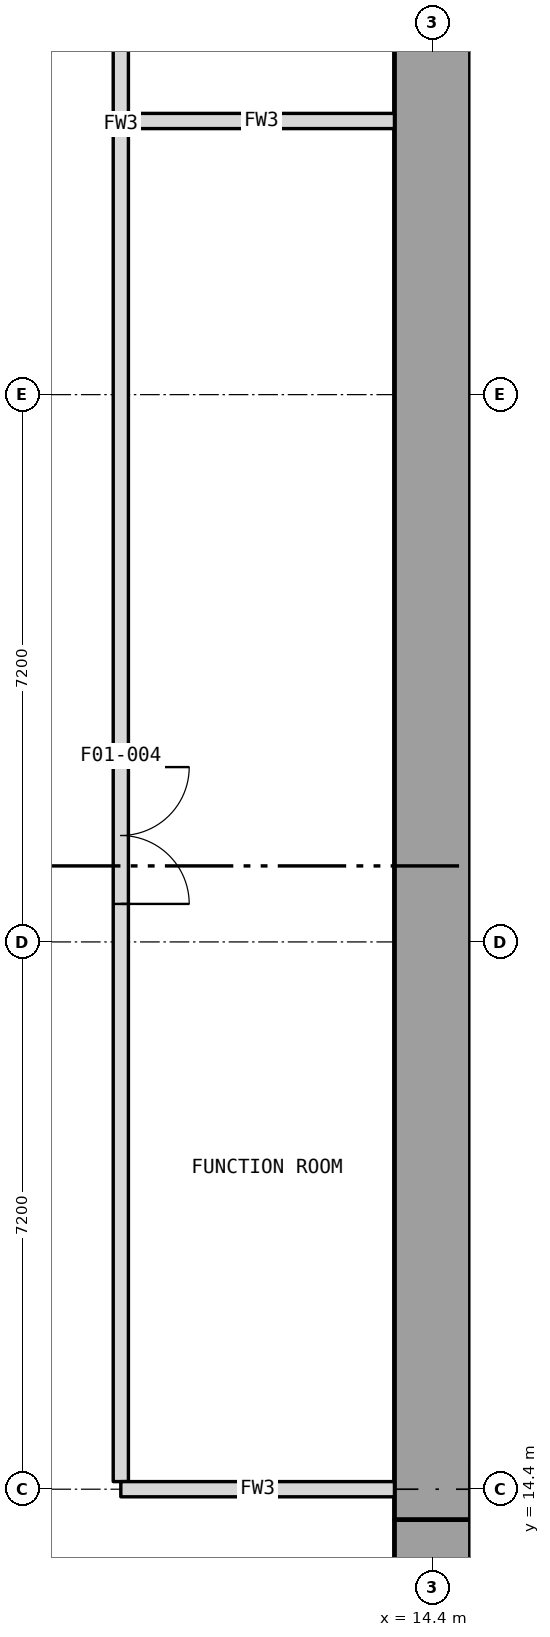
"""IFC4 building model, lengths in metres.
Left out: names, types, materials, properties, quantities, classifications, styles, units other than length and angle.
Written with IfcOpenShell. Run it as: python <this file> out.ifc"""

import sys

from ifc_helpers import new_model, si_unit, direction, frame, frame_2d, origin, place, context, subcontext, project, spatial, rectangle, extrude, element, fill, save


model = new_model("IFC4")
c1 = context("Model", 3, precision=1e-05, world=origin(), true_north=direction((0.0, 1.0)))
c2 = subcontext(c1, "Body", "Model", "MODEL_VIEW")
j1 = project(units=[si_unit("LENGTHUNIT", "METRE"), si_unit("PLANEANGLEUNIT", "RADIAN")], contexts=[c1])
p1 = place(None, origin())
s1 = spatial("IfcSite", under=j1, at=p1, CompositionType="ELEMENT")
p2 = place(p1, origin())
s2 = spatial("IfcBuilding", under=s1, at=p2, CompositionType="ELEMENT")
p3 = place(p2, frame((0.0, 0.0, 6.0)))
s3 = spatial("IfcBuildingStorey", under=s2, at=p3, CompositionType="ELEMENT", Elevation=6.0)
p4 = place(p3, frame((14.4, 11.4, 0.0), z_axis=(0.0, 0.0, 1.0), x_axis=(0.0, 1.0, 0.0)))
e1 = element("IfcWall", 1, at=p4, inside=s3, PredefinedType="SOLIDWALL", context=c2, shape_type="SweptSolid", body=[
    extrude(rectangle(XDim=2.6, YDim=1.0, at=frame_2d((1.3, 0.0))), origin(), (0.0, 0.0, 1.0), 5.0),
])
p5 = place(p3, frame((14.4, 14.0, 0.0), z_axis=(0.0, 0.0, 1.0), x_axis=(0.0, 1.0, 0.0)))
e2 = element("IfcWall", 2, at=p5, inside=s3, PredefinedType="SOLIDWALL", context=c2, shape_type="SweptSolid", body=[
    extrude(rectangle(XDim=49.9, YDim=1.0, at=frame_2d((24.95, 0.0))), origin(), (0.0, 0.0, 1.0), 6.0),
])
p6 = place(p3, frame((10.3, 14.5, 0.0), z_axis=(0.0, 0.0, 1.0), x_axis=(0.0, 1.0, 0.0)))
e3 = element("IfcWall", 3, at=p6, inside=s3, PredefinedType="PARTITIONING", context=c2, shape_type="SweptSolid", body=[
    extrude(rectangle(XDim=35.725, YDim=0.2, at=frame_2d((17.863, 0.0))), origin(), (0.0, 0.0, 1.0), 5.75),
])
p7 = place(p6, frame((7.6, 0.0, 0.0)))
e4 = element("IfcOpeningElement", 4, at=p7, cuts=e3, PredefinedType="OPENING", context=c2, shape_type="SweptSolid", body=[
    extrude(rectangle(XDim=1.8, YDim=2.1, at=frame_2d((0.9, 1.05))), frame((0.0, 0.11, 0.0), z_axis=(0.0, -1.0, 0.0), x_axis=(1.0, 0.0, 0.0)), (0.0, 0.0, 1.0), 0.22),
])
p8 = place(p6, frame((26.0, 0.0, 0.0)))
e5 = element("IfcOpeningElement", 5, at=p8, cuts=e3, PredefinedType="OPENING", context=c2, shape_type="SweptSolid", body=[
    extrude(rectangle(XDim=1.8, YDim=2.1, at=frame_2d((0.9, 1.05))), frame((0.0, 0.11, 0.0), z_axis=(0.0, -1.0, 0.0), x_axis=(1.0, 0.0, 0.0)), (0.0, 0.0, 1.0), 0.22),
])
p9 = place(p3, frame((10.3, 14.4, 0.0), z_axis=(0.0, 0.0, 1.0), x_axis=(1.0, 0.0, 0.0)))
e6 = element("IfcWall", 6, at=p9, inside=s3, PredefinedType="PARTITIONING", context=c2, shape_type="SweptSolid", body=[
    extrude(rectangle(XDim=3.6, YDim=0.2, at=frame_2d((1.8, 0.0))), origin(), (0.0, 0.0, 1.0), 5.75),
])
p10 = place(p3, frame((10.4, 32.4, 0.0), z_axis=(0.0, 0.0, 1.0), x_axis=(1.0, 0.0, 0.0)))
e7 = element("IfcWall", 7, at=p10, inside=s3, PredefinedType="PARTITIONING", context=c2, shape_type="SweptSolid", body=[
    extrude(rectangle(XDim=3.5, YDim=0.2, at=frame_2d((1.75, 0.0))), origin(), (0.0, 0.0, 1.0), 5.75),
])
p11 = place(p7, frame((1.8, 0.0, 0.0), z_axis=(0.0, 0.0, 1.0), x_axis=(-1.0, 0.0, 0.0)))
e8 = element("IfcDoor", 8, at=p11, inside=s3, OperationType="DOUBLE_DOOR_SINGLE_SWING", PredefinedType="DOOR", context=c2, shape_type="SweptSolid", body=[
    extrude(rectangle(XDim=1.8, YDim=2.1, at=frame_2d((0.9, 1.05))), frame((0.0, 0.025, 0.0), z_axis=(0.0, -1.0, 0.0), x_axis=(1.0, 0.0, 0.0)), (0.0, 0.0, 1.0), 0.05),
])
fill(e4, e8)
save(model, sys.argv[1])
